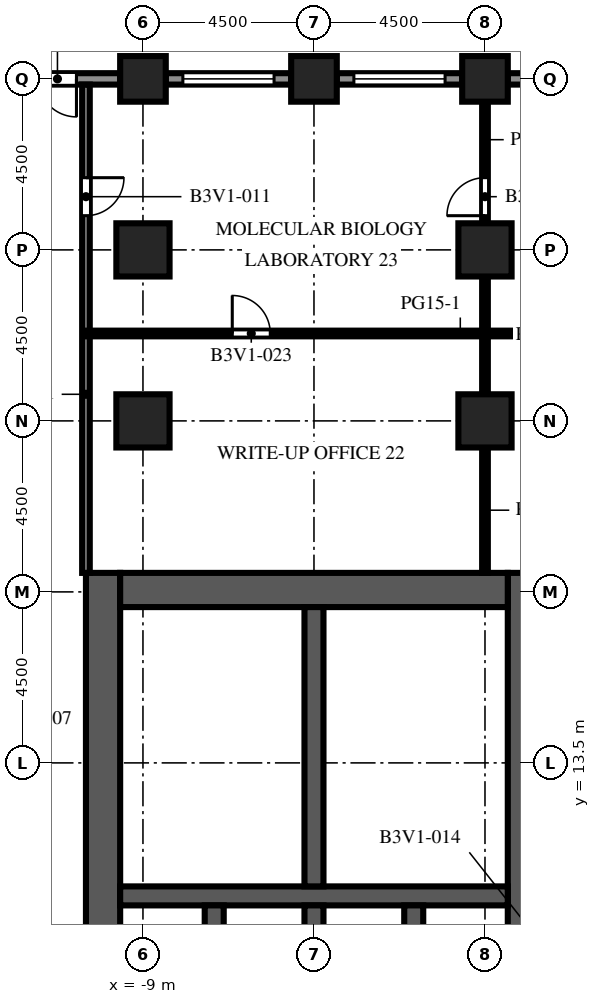
"""IFC4 building model, lengths in metres.
Left out: names, types, materials, properties, quantities, classifications, styles, units other than length and angle.
Written with IfcOpenShell. Run it as: python <this file> out.ifc"""

import sys

from ifc_helpers import new_model, si_unit, direction, frame, frame_2d, origin, origin_2d, place, context, subcontext, project, spatial, rectangle, extrude, element, fill, save


model = new_model("IFC4")
c1 = context("Model", 3, precision=1e-05, world=origin(), true_north=direction((0.0, 1.0)))
c2 = subcontext(c1, "Body", "Model", "MODEL_VIEW")
j1 = project(units=[si_unit("LENGTHUNIT", "METRE"), si_unit("PLANEANGLEUNIT", "RADIAN")], contexts=[c1])
p1 = place(None, origin())
s1 = spatial("IfcSite", under=j1, at=p1, CompositionType="ELEMENT")
p2 = place(p1, origin())
s2 = spatial("IfcBuilding", under=s1, at=p2, CompositionType="ELEMENT")
p3 = place(p2, frame((0.0, 0.0, 94.3)))
s3 = spatial("IfcBuildingStorey", under=s2, at=p3, CompositionType="ELEMENT", Elevation=94.3)
for number, where, z_axis, x_axis in (
    (1, (-9.0, 31.5, 0.0), (0.0, 0.0, 1.0), (1.0, 0.0, 0.0)),
    (2, (-4.5, 31.5, 0.0), (0.0, 0.0, 1.0), (1.0, 0.0, 0.0)),
    (3, (0.0, 31.5, 0.0), (0.0, 0.0, 1.0), (1.0, 0.0, 0.0)),
):
    element("IfcColumn", number, at=place(p3, frame(where, z_axis=z_axis, x_axis=x_axis)), inside=s3, PredefinedType="COLUMN", context=c2, shape_type="SweptSolid", body=[
        extrude(rectangle(XDim=1.2, YDim=1.2, at=origin_2d()), origin(), (0.0, 0.0, 1.0), 4.1),
    ])
for number, where, z_axis, x_axis in (
    (4, (-9.0, 22.5, 0.0), (0.0, 0.0, 1.0), (1.0, 0.0, 0.0)),
    (5, (-9.0, 27.0, 0.0), (0.0, 0.0, 1.0), (1.0, 0.0, 0.0)),
    (6, (0.0, 22.5, 0.0), (0.0, 0.0, 1.0), (1.0, 0.0, 0.0)),
    (7, (0.0, 27.0, 0.0), (0.0, 0.0, 1.0), (1.0, 0.0, 0.0)),
):
    element("IfcColumn", number, at=place(p3, frame(where, z_axis=z_axis, x_axis=x_axis)), inside=s3, PredefinedType="COLUMN", context=c2, shape_type="SweptSolid", body=[
        extrude(rectangle(XDim=1.4, YDim=1.4, at=origin_2d()), origin(), (0.0, 0.0, 1.0), 4.1),
    ])
p4 = place(p3, frame((-10.05, -9.0, 0.0), z_axis=(0.0, 0.0, 1.0), x_axis=(0.0, 1.0, 0.0)))
e8 = element("IfcWall", 8, at=p4, inside=s3, PredefinedType="SHEAR", context=c2, shape_type="SweptSolid", body=[
    extrude(rectangle(XDim=27.5, YDim=0.9, at=frame_2d((13.75, 0.0))), origin(), (0.0, 0.0, 1.0), 4.1),
])
p5 = place(p4, frame((12.55, 0.0, 0.0)))
e9 = element("IfcOpeningElement", 9, at=p5, cuts=e8, PredefinedType="OPENING", context=c2, shape_type="SweptSolid", body=[
    extrude(rectangle(XDim=2.4, YDim=2.4, at=frame_2d((1.2, 1.2))), frame((0.0, 0.46, 0.0), z_axis=(0.0, -1.0, 0.0), x_axis=(1.0, 0.0, 0.0)), (0.0, 0.0, 1.0), 0.92),
])
p6 = place(p4, frame((6.825, 0.0, 0.0)))
e10 = element("IfcOpeningElement", 10, at=p6, cuts=e8, PredefinedType="OPENING", context=c2, shape_type="SweptSolid", body=[
    extrude(rectangle(XDim=1.2, YDim=2.1, at=frame_2d((0.6, 1.05))), frame((0.0, 0.46, 0.0), z_axis=(0.0, -1.0, 0.0), x_axis=(1.0, 0.0, 0.0)), (0.0, 0.0, 1.0), 0.92),
])
p7 = place(p4, frame((19.475, 0.0, 0.0)))
e11 = element("IfcOpeningElement", 11, at=p7, cuts=e8, PredefinedType="OPENING", context=c2, shape_type="SweptSolid", body=[
    extrude(rectangle(XDim=1.2, YDim=2.1, at=frame_2d((0.6, 1.05))), frame((0.0, 0.46, 0.0), z_axis=(0.0, -1.0, 0.0), x_axis=(1.0, 0.0, 0.0)), (0.0, 0.0, 1.0), 0.92),
])
p8 = place(p3, frame((1.05, -9.0, 0.0), z_axis=(0.0, 0.0, 1.0), x_axis=(0.0, 1.0, 0.0)))
e12 = element("IfcWall", 12, at=p8, inside=s3, PredefinedType="SHEAR", context=c2, shape_type="SweptSolid", body=[
    extrude(rectangle(XDim=27.5, YDim=0.9, at=frame_2d((13.75, 0.0))), origin(), (0.0, 0.0, 1.0), 4.1),
])
p9 = place(p8, frame((12.55, 0.0, 0.0)))
e13 = element("IfcOpeningElement", 13, at=p9, cuts=e12, PredefinedType="OPENING", context=c2, shape_type="SweptSolid", body=[
    extrude(rectangle(XDim=2.4, YDim=2.4, at=frame_2d((1.2, 1.2))), frame((0.0, 0.46, 0.0), z_axis=(0.0, -1.0, 0.0), x_axis=(1.0, 0.0, 0.0)), (0.0, 0.0, 1.0), 0.92),
])
p10 = place(p8, frame((3.975, 0.0, 0.0)))
e14 = element("IfcOpeningElement", 14, at=p10, cuts=e12, PredefinedType="OPENING", context=c2, shape_type="SweptSolid", body=[
    extrude(rectangle(XDim=1.2, YDim=2.1, at=frame_2d((0.6, 1.05))), frame((0.0, 0.46, 0.0), z_axis=(0.0, -1.0, 0.0), x_axis=(1.0, 0.0, 0.0)), (0.0, 0.0, 1.0), 0.92),
])
p11 = place(p8, frame((22.325, 0.0, 0.0)))
e15 = element("IfcOpeningElement", 15, at=p11, cuts=e12, PredefinedType="OPENING", context=c2, shape_type="SweptSolid", body=[
    extrude(rectangle(XDim=1.2, YDim=2.1, at=frame_2d((0.6, 1.05))), frame((0.0, 0.46, 0.0), z_axis=(0.0, -1.0, 0.0), x_axis=(1.0, 0.0, 0.0)), (0.0, 0.0, 1.0), 0.92),
])
p12 = place(p3, frame((-9.6, 18.05, 0.0), z_axis=(0.0, 0.0, 1.0), x_axis=(1.0, 0.0, 0.0)))
e16 = element("IfcWall", 16, at=p12, inside=s3, PredefinedType="SHEAR", context=c2, shape_type="SweptSolid", body=[
    extrude(rectangle(XDim=10.2, YDim=0.9, at=frame_2d((5.1, 0.0))), origin(), (0.0, 0.0, 1.0), 4.1),
])
p13 = place(p3, frame((-9.6, 10.0, 0.0), z_axis=(0.0, 0.0, 1.0), x_axis=(1.0, 0.0, 0.0)))
e17 = element("IfcWall", 17, at=p13, inside=s3, PredefinedType="SHEAR", context=c2, shape_type="SweptSolid", body=[
    extrude(rectangle(XDim=10.2, YDim=0.5, at=frame_2d((5.1, 0.0))), origin(), (0.0, 0.0, 1.0), 4.1),
])
for number, where, z_axis, x_axis in (
    (18, (-7.125, 6.95, 0.0), (0.0, 0.0, 1.0), (0.0, 1.0, 0.0)),
    (19, (-4.5, 6.95, 0.0), (0.0, 0.0, 1.0), (0.0, 1.0, 0.0)),
    (20, (-1.875, 6.95, 0.0), (0.0, 0.0, 1.0), (0.0, 1.0, 0.0)),
):
    element("IfcWall", number, at=place(p3, frame(where, z_axis=z_axis, x_axis=x_axis)), inside=s3, PredefinedType="SHEAR", context=c2, shape_type="SweptSolid", body=[
        extrude(rectangle(XDim=2.8, YDim=0.5, at=frame_2d((1.4, 0.0))), origin(), (0.0, 0.0, 1.0), 4.1),
    ])
p14 = place(p3, frame((-4.5, 10.25, 0.0), z_axis=(0.0, 0.0, 1.0), x_axis=(0.0, 1.0, 0.0)))
e21 = element("IfcWall", 21, at=p14, inside=s3, PredefinedType="SHEAR", context=c2, shape_type="SweptSolid", body=[
    extrude(rectangle(XDim=7.35, YDim=0.5, at=frame_2d((3.675, 0.0))), origin(), (0.0, 0.0, 1.0), 4.1),
])
p15 = place(p3, frame((0.6, 31.5, 0.0), z_axis=(0.0, 0.0, 1.0), x_axis=(1.0, 0.0, 0.0)))
e22 = element("IfcWall", 22, at=p15, inside=s3, PredefinedType="SOLIDWALL", context=c2, shape_type="SweptSolid", body=[
    extrude(rectangle(XDim=3.3, YDim=0.3, at=frame_2d((1.65, 0.0))), origin(), (0.0, 0.0, 1.0), 2.75),
])
p16 = place(p15, frame((0.45, 0.0, 0.8)))
e23 = element("IfcOpeningElement", 23, at=p16, cuts=e22, PredefinedType="OPENING", context=c2, shape_type="SweptSolid", body=[
    extrude(rectangle(XDim=2.4, YDim=1.7, at=frame_2d((1.2, 0.85))), frame((0.0, 0.16, 0.0), z_axis=(0.0, -1.0, 0.0), x_axis=(1.0, 0.0, 0.0)), (0.0, 0.0, 1.0), 0.32),
])
p17 = place(p3, frame((-3.9, 31.5, 0.0), z_axis=(0.0, 0.0, 1.0), x_axis=(1.0, 0.0, 0.0)))
e24 = element("IfcWall", 24, at=p17, inside=s3, PredefinedType="SOLIDWALL", context=c2, shape_type="SweptSolid", body=[
    extrude(rectangle(XDim=3.3, YDim=0.3, at=frame_2d((1.65, 0.0))), origin(), (0.0, 0.0, 1.0), 2.75),
])
p18 = place(p17, frame((0.45, 0.0, 0.8)))
e25 = element("IfcOpeningElement", 25, at=p18, cuts=e24, PredefinedType="OPENING", context=c2, shape_type="SweptSolid", body=[
    extrude(rectangle(XDim=2.4, YDim=1.7, at=frame_2d((1.2, 0.85))), frame((0.0, 0.16, 0.0), z_axis=(0.0, -1.0, 0.0), x_axis=(1.0, 0.0, 0.0)), (0.0, 0.0, 1.0), 0.32),
])
p19 = place(p3, frame((-8.4, 31.5, 0.0), z_axis=(0.0, 0.0, 1.0), x_axis=(1.0, 0.0, 0.0)))
e26 = element("IfcWall", 26, at=p19, inside=s3, PredefinedType="SOLIDWALL", context=c2, shape_type="SweptSolid", body=[
    extrude(rectangle(XDim=3.3, YDim=0.3, at=frame_2d((1.65, 0.0))), origin(), (0.0, 0.0, 1.0), 2.75),
])
p20 = place(p19, frame((0.45, 0.0, 0.8)))
e27 = element("IfcOpeningElement", 27, at=p20, cuts=e26, PredefinedType="OPENING", context=c2, shape_type="SweptSolid", body=[
    extrude(rectangle(XDim=2.4, YDim=1.7, at=frame_2d((1.2, 0.85))), frame((0.0, 0.16, 0.0), z_axis=(0.0, -1.0, 0.0), x_axis=(1.0, 0.0, 0.0)), (0.0, 0.0, 1.0), 0.32),
])
p21 = place(p3, frame((-12.9, 31.5, 0.0), z_axis=(0.0, 0.0, 1.0), x_axis=(1.0, 0.0, 0.0)))
e28 = element("IfcWall", 28, at=p21, inside=s3, PredefinedType="SOLIDWALL", context=c2, shape_type="SweptSolid", body=[
    extrude(rectangle(XDim=3.3, YDim=0.3, at=frame_2d((1.65, 0.0))), origin(), (0.0, 0.0, 1.0), 2.75),
])
p22 = place(p21, frame((1.15, 0.0, 0.0)))
e29 = element("IfcOpeningElement", 29, at=p22, cuts=e28, PredefinedType="OPENING", context=c2, shape_type="SweptSolid", body=[
    extrude(rectangle(XDim=1.0, YDim=2.2, at=frame_2d((0.5, 1.1))), frame((0.0, 0.16, 0.0), z_axis=(0.0, -1.0, 0.0), x_axis=(1.0, 0.0, 0.0)), (0.0, 0.0, 1.0), 0.32),
])
p23 = place(p3, frame((-0.8, 10.25, 0.0), z_axis=(0.0, 0.0, 1.0), x_axis=(0.0, 1.0, 0.0)))
e30 = element("IfcWall", 30, at=p23, inside=s3, PredefinedType="PARTITIONING", context=c2, shape_type="SweptSolid", body=[
    extrude(rectangle(XDim=2.205, YDim=0.1, at=frame_2d((1.103, 0.0))), origin(), (0.0, 0.0, 1.0), 3.65),
])
p24 = place(p23, frame((0.603, 0.0, 0.0)))
e31 = element("IfcOpeningElement", 31, at=p24, cuts=e30, PredefinedType="OPENING", context=c2, shape_type="SweptSolid", body=[
    extrude(rectangle(XDim=1.0, YDim=2.1, at=frame_2d((0.5, 1.05))), frame((0.0, 0.06, 0.0), z_axis=(0.0, -1.0, 0.0), x_axis=(1.0, 0.0, 0.0)), (0.0, 0.0, 1.0), 0.12),
])
p25 = place(p3, frame((-0.8, 12.455, 0.0), z_axis=(0.0, 0.0, 1.0), x_axis=(0.0, 1.0, 0.0)))
e32 = element("IfcWall", 32, at=p25, inside=s3, PredefinedType="PARTITIONING", context=c2, shape_type="SweptSolid", body=[
    extrude(rectangle(XDim=2.352, YDim=0.1, at=frame_2d((1.176, 0.0))), origin(), (0.0, 0.0, 1.0), 3.65),
])
p26 = place(p25, frame((0.676, 0.0, 0.0)))
e33 = element("IfcOpeningElement", 33, at=p26, cuts=e32, PredefinedType="OPENING", context=c2, shape_type="SweptSolid", body=[
    extrude(rectangle(XDim=1.0, YDim=2.1, at=frame_2d((0.5, 1.05))), frame((0.0, 0.06, 0.0), z_axis=(0.0, -1.0, 0.0), x_axis=(1.0, 0.0, 0.0)), (0.0, 0.0, 1.0), 0.12),
])
p27 = place(p3, frame((-0.8, 14.807, 0.0), z_axis=(0.0, 0.0, 1.0), x_axis=(0.0, 1.0, 0.0)))
e34 = element("IfcWall", 34, at=p27, inside=s3, PredefinedType="PARTITIONING", context=c2, shape_type="SweptSolid", body=[
    extrude(rectangle(XDim=2.793, YDim=0.1, at=frame_2d((1.396, 0.0))), origin(), (0.0, 0.0, 1.0), 3.65),
])
p28 = place(p27, frame((0.896, 0.0, 0.0)))
e35 = element("IfcOpeningElement", 35, at=p28, cuts=e34, PredefinedType="OPENING", context=c2, shape_type="SweptSolid", body=[
    extrude(rectangle(XDim=1.0, YDim=2.1, at=frame_2d((0.5, 1.05))), frame((0.0, 0.06, 0.0), z_axis=(0.0, -1.0, 0.0), x_axis=(1.0, 0.0, 0.0)), (0.0, 0.0, 1.0), 0.12),
])
for number, where, z_axis, x_axis in (
    (36, (-4.25, 12.455, 0.0), (0.0, 0.0, 1.0), (1.0, 0.0, 0.0)),
    (37, (-4.25, 14.807, 0.0), (0.0, 0.0, 1.0), (1.0, 0.0, 0.0)),
):
    element("IfcWall", number, at=place(p3, frame(where, z_axis=z_axis, x_axis=x_axis)), inside=s3, PredefinedType="PARTITIONING", context=c2, shape_type="SweptSolid", body=[
        extrude(rectangle(XDim=3.45, YDim=0.1, at=frame_2d((1.725, 0.0))), origin(), (0.0, 0.0, 1.0), 3.65),
    ])
p29 = place(p3, frame((-10.5, 31.35, 0.0), z_axis=(0.0, 0.0, 1.0), x_axis=(0.0, -1.0, 0.0)))
e38 = element("IfcWall", 38, at=p29, inside=s3, PredefinedType="PARTITIONING", context=c2, shape_type="SweptSolid", body=[
    extrude(rectangle(XDim=12.85, YDim=0.2, at=frame_2d((6.425, 0.0))), origin(), (0.0, 0.0, 1.0), 3.65),
])
p30 = place(p29, frame((2.45, 0.0, 0.0)))
e39 = element("IfcOpeningElement", 39, at=p30, cuts=e38, PredefinedType="OPENING", context=c2, shape_type="SweptSolid", body=[
    extrude(rectangle(XDim=1.0, YDim=2.1, at=frame_2d((0.5, 1.05))), frame((0.0, 0.11, 0.0), z_axis=(0.0, -1.0, 0.0), x_axis=(1.0, 0.0, 0.0)), (0.0, 0.0, 1.0), 0.22),
])
p31 = place(p3, frame((0.0, 18.5, 0.0), z_axis=(0.0, 0.0, 1.0), x_axis=(0.0, 1.0, 0.0)))
e40 = element("IfcWall", 40, at=p31, inside=s3, PredefinedType="PARTITIONING", context=c2, shape_type="SweptSolid", body=[
    extrude(rectangle(XDim=3.3, YDim=0.15, at=frame_2d((1.65, 0.0))), origin(), (0.0, 0.0, 1.0), 3.65),
])
p32 = place(p3, frame((0.0, 23.2, 0.0), z_axis=(0.0, 0.0, 1.0), x_axis=(0.0, 1.0, 0.0)))
e41 = element("IfcWall", 41, at=p32, inside=s3, PredefinedType="PARTITIONING", context=c2, shape_type="SweptSolid", body=[
    extrude(rectangle(XDim=3.1, YDim=0.15, at=frame_2d((1.55, 0.0))), origin(), (0.0, 0.0, 1.0), 3.65),
])
p33 = place(p3, frame((0.0, 30.9, 0.0), z_axis=(0.0, 0.0, 1.0), x_axis=(0.0, -1.0, 0.0)))
e42 = element("IfcWall", 42, at=p33, inside=s3, PredefinedType="PARTITIONING", context=c2, shape_type="SweptSolid", body=[
    extrude(rectangle(XDim=3.2, YDim=0.15, at=frame_2d((1.6, 0.0))), origin(), (0.0, 0.0, 1.0), 3.65),
])
p34 = place(p33, frame((2.0, 0.0, 0.0)))
e43 = element("IfcOpeningElement", 43, at=p34, cuts=e42, PredefinedType="OPENING", context=c2, shape_type="SweptSolid", body=[
    extrude(rectangle(XDim=1.0, YDim=2.1, at=frame_2d((0.5, 1.05))), frame((0.0, 0.085, 0.0), z_axis=(0.0, -1.0, 0.0), x_axis=(1.0, 0.0, 0.0)), (0.0, 0.0, 1.0), 0.17),
])
p35 = place(p3, frame((18.0, 24.8, 0.0), z_axis=(0.0, 0.0, 1.0), x_axis=(-1.0, 0.0, 0.0)))
e44 = element("IfcWall", 44, at=p35, inside=s3, PredefinedType="PARTITIONING", context=c2, shape_type="SweptSolid", body=[
    extrude(rectangle(XDim=28.5, YDim=0.15, at=frame_2d((14.25, 0.0))), origin(), (0.0, 0.0, 1.0), 3.65),
])
p36 = place(p35, frame((23.65, 0.0, 0.0)))
e45 = element("IfcOpeningElement", 45, at=p36, cuts=e44, PredefinedType="OPENING", context=c2, shape_type="SweptSolid", body=[
    extrude(rectangle(XDim=1.0, YDim=2.1, at=frame_2d((0.5, 1.05))), frame((0.0, 0.085, 0.0), z_axis=(0.0, -1.0, 0.0), x_axis=(1.0, 0.0, 0.0)), (0.0, 0.0, 1.0), 0.17),
])
p37 = place(p35, frame((12.65, 0.0, 0.0)))
e46 = element("IfcOpeningElement", 46, at=p37, cuts=e44, PredefinedType="OPENING", context=c2, shape_type="SweptSolid", body=[
    extrude(rectangle(XDim=1.0, YDim=2.1, at=frame_2d((0.5, 1.05))), frame((0.0, 0.085, 0.0), z_axis=(0.0, -1.0, 0.0), x_axis=(1.0, 0.0, 0.0)), (0.0, 0.0, 1.0), 0.17),
])
p38 = place(p35, frame((1.9, 0.0, 0.0)))
e47 = element("IfcOpeningElement", 47, at=p38, cuts=e44, PredefinedType="OPENING", context=c2, shape_type="SweptSolid", body=[
    extrude(rectangle(XDim=1.0, YDim=2.1, at=frame_2d((0.5, 1.05))), frame((0.0, 0.085, 0.0), z_axis=(0.0, -1.0, 0.0), x_axis=(1.0, 0.0, 0.0)), (0.0, 0.0, 1.0), 0.17),
])
p39 = place(p18, origin())
e48 = element("IfcWindow", 48, at=p39, inside=s3, PartitioningType="SINGLE_PANEL", PredefinedType="WINDOW", context=c2, shape_type="SweptSolid", body=[
    extrude(rectangle(XDim=2.4, YDim=1.7, at=frame_2d((1.2, 0.85))), frame((0.0, 0.03, 0.0), z_axis=(0.0, -1.0, 0.0), x_axis=(1.0, 0.0, 0.0)), (0.0, 0.0, 1.0), 0.06),
])
fill(e25, e48)
p40 = place(p20, origin())
e49 = element("IfcWindow", 49, at=p40, inside=s3, PartitioningType="SINGLE_PANEL", PredefinedType="WINDOW", context=c2, shape_type="SweptSolid", body=[
    extrude(rectangle(XDim=2.4, YDim=1.7, at=frame_2d((1.2, 0.85))), frame((0.0, 0.03, 0.0), z_axis=(0.0, -1.0, 0.0), x_axis=(1.0, 0.0, 0.0)), (0.0, 0.0, 1.0), 0.06),
])
fill(e27, e49)
p41 = place(p22, origin())
e50 = element("IfcDoor", 50, at=p41, inside=s3, OperationType="SINGLE_SWING_RIGHT", PredefinedType="DOOR", context=c2, shape_type="SweptSolid", body=[
    extrude(rectangle(XDim=1.0, YDim=2.2, at=frame_2d((0.5, 1.1))), frame((0.0, 0.025, 0.0), z_axis=(0.0, -1.0, 0.0), x_axis=(1.0, 0.0, 0.0)), (0.0, 0.0, 1.0), 0.05),
])
fill(e29, e50)
p42 = place(p7, origin())
e51 = element("IfcDoor", 51, at=p42, inside=s3, OperationType="SINGLE_SWING_LEFT", PredefinedType="DOOR", context=c2, shape_type="SweptSolid", body=[
    extrude(rectangle(XDim=1.2, YDim=2.1, at=frame_2d((0.6, 1.05))), frame((0.0, 0.025, 0.0), z_axis=(0.0, -1.0, 0.0), x_axis=(1.0, 0.0, 0.0)), (0.0, 0.0, 1.0), 0.05),
])
fill(e11, e51)
p43 = place(p11, origin())
e52 = element("IfcDoor", 52, at=p43, inside=s3, OperationType="SINGLE_SWING_LEFT", PredefinedType="DOOR", context=c2, shape_type="SweptSolid", body=[
    extrude(rectangle(XDim=1.2, YDim=2.1, at=frame_2d((0.6, 1.05))), frame((0.0, 0.425, 0.0), z_axis=(0.0, -1.0, 0.0), x_axis=(1.0, 0.0, 0.0)), (0.0, 0.0, 1.0), 0.05),
])
fill(e15, e52)
p44 = place(p24, origin())
e53 = element("IfcDoor", 53, at=p44, inside=s3, OperationType="SINGLE_SWING_RIGHT", PredefinedType="DOOR", context=c2, shape_type="SweptSolid", body=[
    extrude(rectangle(XDim=1.0, YDim=2.1, at=frame_2d((0.5, 1.05))), frame((0.0, 0.025, 0.0), z_axis=(0.0, -1.0, 0.0), x_axis=(1.0, 0.0, 0.0)), (0.0, 0.0, 1.0), 0.05),
])
fill(e31, e53)
p45 = place(p26, origin())
e54 = element("IfcDoor", 54, at=p45, inside=s3, OperationType="SINGLE_SWING_LEFT", PredefinedType="DOOR", context=c2, shape_type="SweptSolid", body=[
    extrude(rectangle(XDim=1.0, YDim=2.1, at=frame_2d((0.5, 1.05))), frame((0.0, 0.025, 0.0), z_axis=(0.0, -1.0, 0.0), x_axis=(1.0, 0.0, 0.0)), (0.0, 0.0, 1.0), 0.05),
])
fill(e33, e54)
p46 = place(p28, origin())
e55 = element("IfcDoor", 55, at=p46, inside=s3, OperationType="SINGLE_SWING_RIGHT", PredefinedType="DOOR", context=c2, shape_type="SweptSolid", body=[
    extrude(rectangle(XDim=1.0, YDim=2.1, at=frame_2d((0.5, 1.05))), frame((0.0, 0.025, 0.0), z_axis=(0.0, -1.0, 0.0), x_axis=(1.0, 0.0, 0.0)), (0.0, 0.0, 1.0), 0.05),
])
fill(e35, e55)
p47 = place(p30, origin())
e56 = element("IfcDoor", 56, at=p47, inside=s3, OperationType="SINGLE_SWING_LEFT", PredefinedType="DOOR", context=c2, shape_type="SweptSolid", body=[
    extrude(rectangle(XDim=1.0, YDim=2.1, at=frame_2d((0.5, 1.05))), frame((0.0, 0.025, 0.0), z_axis=(0.0, -1.0, 0.0), x_axis=(1.0, 0.0, 0.0)), (0.0, 0.0, 1.0), 0.05),
])
fill(e39, e56)
p48 = place(p34, origin())
e57 = element("IfcDoor", 57, at=p48, inside=s3, OperationType="SINGLE_SWING_RIGHT", PredefinedType="DOOR", context=c2, shape_type="SweptSolid", body=[
    extrude(rectangle(XDim=1.0, YDim=2.1, at=frame_2d((0.5, 1.05))), frame((0.0, 0.025, 0.0), z_axis=(0.0, -1.0, 0.0), x_axis=(1.0, 0.0, 0.0)), (0.0, 0.0, 1.0), 0.05),
])
fill(e43, e57)
p49 = place(p36, origin())
e58 = element("IfcDoor", 58, at=p49, inside=s3, OperationType="SINGLE_SWING_RIGHT", PredefinedType="DOOR", context=c2, shape_type="SweptSolid", body=[
    extrude(rectangle(XDim=1.0, YDim=2.1, at=frame_2d((0.5, 1.05))), frame((0.0, 0.025, 0.0), z_axis=(0.0, -1.0, 0.0), x_axis=(1.0, 0.0, 0.0)), (0.0, 0.0, 1.0), 0.05),
])
fill(e45, e58)
save(model, sys.argv[1])
